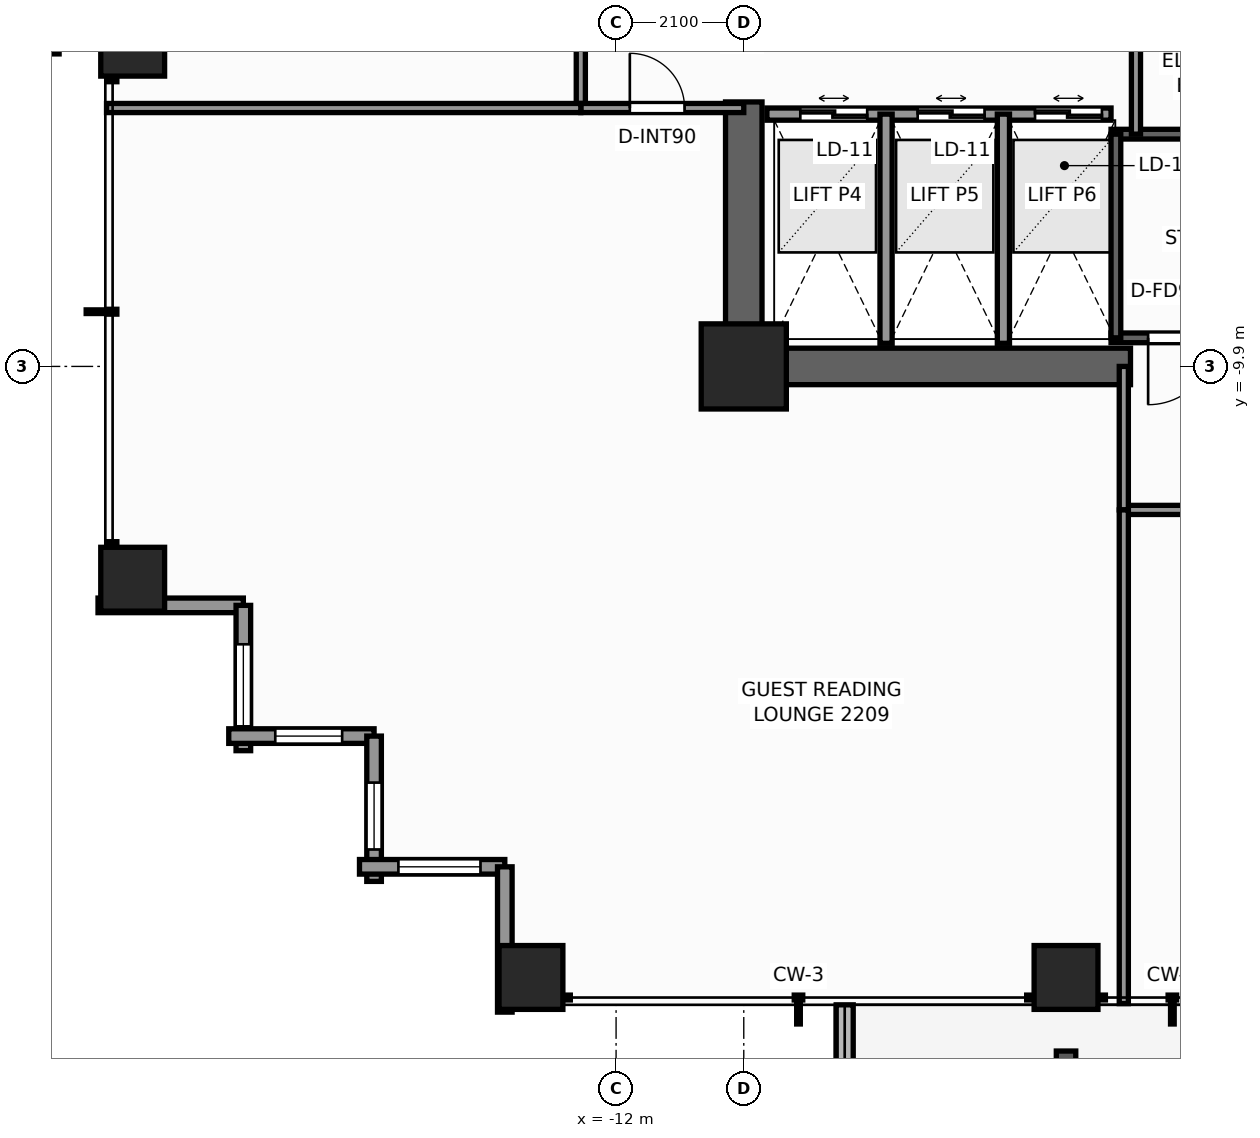
"""IFC4 building model, lengths in metres.
Left out: names, types, materials, properties, quantities, classifications, styles, units other than length and angle.
Written with IfcOpenShell. Run it as: python <this file> out.ifc"""

import sys

from ifc_helpers import new_model, si_unit, direction, frame, frame_2d, origin, origin_2d, place, context, subcontext, project, spatial, rectangle, extrude, element, fill, save


model = new_model("IFC4")
c1 = context("Model", 3, precision=1e-05, world=origin(), true_north=direction((0.0, 1.0)))
c2 = subcontext(c1, "Body", "Model", "MODEL_VIEW")
j1 = project(units=[si_unit("LENGTHUNIT", "METRE"), si_unit("PLANEANGLEUNIT", "RADIAN")], contexts=[c1])
p1 = place(None, origin())
s1 = spatial("IfcSite", under=j1, at=p1, CompositionType="ELEMENT")
p2 = place(p1, origin())
s2 = spatial("IfcBuilding", under=s1, at=p2, CompositionType="ELEMENT")
p3 = place(p2, frame((0.0, 0.0, 78.8)))
s3 = spatial("IfcBuildingStorey", under=s2, at=p3, CompositionType="ELEMENT", Elevation=78.8)
p4 = place(p3, frame((-3.54, -9.9, 0.0), z_axis=(0.0, 0.0, 1.0), x_axis=(-1.0, 0.0, 0.0)))
e1 = element("IfcWall", 1, at=p4, inside=s3, PredefinedType="SHEAR", context=c2, shape_type="SweptSolid", body=[
    extrude(rectangle(XDim=6.66, YDim=0.6, at=frame_2d((3.33, 0.0))), origin(), (0.0, 0.0, 1.0), 3.3),
])
p5 = place(p3, frame((-9.9, -9.6, 0.0), z_axis=(0.0, 0.0, 1.0), x_axis=(0.0, 1.0, 0.0)))
e2 = element("IfcWall", 2, at=p5, inside=s3, PredefinedType="SHEAR", context=c2, shape_type="SweptSolid", body=[
    extrude(rectangle(XDim=4.05, YDim=0.6, at=frame_2d((2.025, 0.0))), origin(), (0.0, 0.0, 1.0), 3.3),
])
p6 = place(p3, frame((-9.9, -9.9, 0.0), z_axis=(0.0, 0.0, 1.0), x_axis=(1.0, 0.0, 0.0)))
e3 = element("IfcColumn", 3, at=p6, inside=s3, PredefinedType="COLUMN", context=c2, shape_type="SweptSolid", body=[
    extrude(rectangle(XDim=1.4, YDim=1.4, at=origin_2d()), origin(), (0.0, 0.0, 1.0), 3.3),
])
for number, where, z_axis, x_axis in (
    (4, (-13.4, -19.95, 0.0), (0.0, 0.0, 1.0), (1.0, 0.0, 0.0)),
    (5, (-4.6, -19.95, 0.0), (0.0, 0.0, 1.0), (1.0, 0.0, 0.0)),
    (6, (-19.95, -13.4, 0.0), (0.0, 0.0, 1.0), (1.0, 0.0, 0.0)),
    (7, (-19.95, -4.6, 0.0), (0.0, 0.0, 1.0), (1.0, 0.0, 0.0)),
):
    element("IfcColumn", number, at=place(p3, frame(where, z_axis=z_axis, x_axis=x_axis)), inside=s3, PredefinedType="COLUMN", context=c2, shape_type="SweptSolid", body=[
        extrude(rectangle(XDim=1.05, YDim=1.05, at=origin_2d()), origin(), (0.0, 0.0, 1.0), 3.3),
    ])
p7 = place(p3, frame((-8.24, -20.4, -0.04), z_axis=(0.0, 0.0, 1.0), x_axis=(0.0, -1.0, 0.0)))
e8 = element("IfcWall", 8, at=p7, inside=s3, PredefinedType="PARAPET", context=c2, shape_type="SweptSolid", body=[
    extrude(rectangle(XDim=1.466, YDim=0.28, at=frame_2d((0.733, 0.0))), origin(), (0.0, 0.0, 1.0), 0.42),
])
p8 = place(p3, frame((-18.13, -13.83, 0.0), z_axis=(0.0, 0.0, 1.0), x_axis=(-1.0, 0.0, 0.0)))
e9 = element("IfcWall", 9, at=p8, inside=s3, PredefinedType="STANDARD", context=c2, shape_type="SweptSolid", body=[
    extrude(rectangle(XDim=2.39, YDim=0.24, at=frame_2d((1.195, 0.0))), origin(), (0.0, 0.0, 1.0), 2.459),
])
p9 = place(p3, frame((-18.13, -16.22, 0.0), z_axis=(0.0, 0.0, 1.0), x_axis=(0.0, 1.0, 0.0)))
e10 = element("IfcWall", 10, at=p9, inside=s3, PredefinedType="STANDARD", context=c2, shape_type="SweptSolid", body=[
    extrude(rectangle(XDim=2.39, YDim=0.24, at=frame_2d((1.195, 0.0))), origin(), (0.0, 0.0, 1.0), 2.459),
])
p10 = place(p9, frame((0.4, 0.0, 0.65)))
e11 = element("IfcOpeningElement", 11, at=p10, cuts=e10, PredefinedType="OPENING", context=c2, shape_type="SweptSolid", body=[
    extrude(rectangle(XDim=1.35, YDim=1.55, at=frame_2d((0.675, 0.775))), frame((0.0, 0.13, 0.0), z_axis=(0.0, -1.0, 0.0), x_axis=(1.0, 0.0, 0.0)), (0.0, 0.0, 1.0), 0.26),
])
p11 = place(p3, frame((-15.98, -15.98, 0.0), z_axis=(0.0, 0.0, 1.0), x_axis=(-1.0, 0.0, 0.0)))
e12 = element("IfcWall", 12, at=p11, inside=s3, PredefinedType="STANDARD", context=c2, shape_type="SweptSolid", body=[
    extrude(rectangle(XDim=2.39, YDim=0.24, at=frame_2d((1.195, 0.0))), origin(), (0.0, 0.0, 1.0), 2.459),
])
p12 = place(p11, frame((0.525, 0.0, 0.65)))
e13 = element("IfcOpeningElement", 13, at=p12, cuts=e12, PredefinedType="OPENING", context=c2, shape_type="SweptSolid", body=[
    extrude(rectangle(XDim=1.1, YDim=1.45, at=frame_2d((0.55, 0.725))), frame((0.0, 0.13, 0.0), z_axis=(0.0, -1.0, 0.0), x_axis=(1.0, 0.0, 0.0)), (0.0, 0.0, 1.0), 0.26),
])
p13 = place(p3, frame((-15.98, -18.37, 0.0), z_axis=(0.0, 0.0, 1.0), x_axis=(0.0, 1.0, 0.0)))
e14 = element("IfcWall", 14, at=p13, inside=s3, PredefinedType="STANDARD", context=c2, shape_type="SweptSolid", body=[
    extrude(rectangle(XDim=2.39, YDim=0.24, at=frame_2d((1.195, 0.0))), origin(), (0.0, 0.0, 1.0), 2.459),
])
p14 = place(p13, frame((0.525, 0.0, 0.65)))
e15 = element("IfcOpeningElement", 15, at=p14, cuts=e14, PredefinedType="OPENING", context=c2, shape_type="SweptSolid", body=[
    extrude(rectangle(XDim=1.1, YDim=1.45, at=frame_2d((0.55, 0.725))), frame((0.0, 0.13, 0.0), z_axis=(0.0, -1.0, 0.0), x_axis=(1.0, 0.0, 0.0)), (0.0, 0.0, 1.0), 0.26),
])
p15 = place(p3, frame((-13.83, -18.13, 0.0), z_axis=(0.0, 0.0, 1.0), x_axis=(-1.0, 0.0, 0.0)))
e16 = element("IfcWall", 16, at=p15, inside=s3, PredefinedType="STANDARD", context=c2, shape_type="SweptSolid", body=[
    extrude(rectangle(XDim=2.39, YDim=0.24, at=frame_2d((1.195, 0.0))), origin(), (0.0, 0.0, 1.0), 2.459),
])
p16 = place(p15, frame((0.4, 0.0, 0.65)))
e17 = element("IfcOpeningElement", 17, at=p16, cuts=e16, PredefinedType="OPENING", context=c2, shape_type="SweptSolid", body=[
    extrude(rectangle(XDim=1.35, YDim=1.55, at=frame_2d((0.675, 0.775))), frame((0.0, 0.13, 0.0), z_axis=(0.0, -1.0, 0.0), x_axis=(1.0, 0.0, 0.0)), (0.0, 0.0, 1.0), 0.26),
])
p17 = place(p3, frame((-13.83, -20.52, 0.0), z_axis=(0.0, 0.0, 1.0), x_axis=(0.0, 1.0, 0.0)))
e18 = element("IfcWall", 18, at=p17, inside=s3, PredefinedType="STANDARD", context=c2, shape_type="SweptSolid", body=[
    extrude(rectangle(XDim=2.39, YDim=0.24, at=frame_2d((1.195, 0.0))), origin(), (0.0, 0.0, 1.0), 2.459),
])
p18 = place(p3, frame((3.86, -9.43, 0.0), z_axis=(0.0, 0.0, 1.0), x_axis=(-1.0, 0.0, 0.0)))
e19 = element("IfcWall", 19, at=p18, inside=s3, PredefinedType="SHEAR", context=c2, shape_type="SweptSolid", body=[
    extrude(rectangle(XDim=7.72, YDim=0.16, at=frame_2d((3.86, 0.0))), origin(), (0.0, 0.0, 1.0), 3.3),
])
p19 = place(p18, frame((6.01, 0.0, 0.0)))
e20 = element("IfcOpeningElement", 20, at=p19, cuts=e19, PredefinedType="OPENING", context=c2, shape_type="SweptSolid", body=[
    extrude(rectangle(XDim=1.1, YDim=2.2, at=frame_2d((0.55, 1.1))), frame((0.0, 0.09, 0.0), z_axis=(0.0, -1.0, 0.0), x_axis=(1.0, 0.0, 0.0)), (0.0, 0.0, 1.0), 0.18),
])
p20 = place(p3, frame((-3.86, -6.08, 0.0), z_axis=(0.0, 0.0, 1.0), x_axis=(1.0, 0.0, 0.0)))
e21 = element("IfcWall", 21, at=p20, inside=s3, PredefinedType="SHEAR", context=c2, shape_type="SweptSolid", body=[
    extrude(rectangle(XDim=7.72, YDim=0.16, at=frame_2d((3.86, 0.0))), origin(), (0.0, 0.0, 1.0), 3.3),
])
p21 = place(p3, frame((-3.78, -9.43, 0.0), z_axis=(0.0, 0.0, 1.0), x_axis=(0.0, 1.0, 0.0)))
e22 = element("IfcWall", 22, at=p21, inside=s3, PredefinedType="SHEAR", context=c2, shape_type="SweptSolid", body=[
    extrude(rectangle(XDim=3.35, YDim=0.16, at=frame_2d((1.675, 0.0))), origin(), (0.0, 0.0, 1.0), 3.3),
])
p22 = place(p3, frame((-9.52, -5.75, 0.0), z_axis=(0.0, 0.0, 1.0), x_axis=(1.0, 0.0, 0.0)))
e23 = element("IfcWall", 23, at=p22, inside=s3, PredefinedType="SOLIDWALL", context=c2, shape_type="SweptSolid", body=[
    extrude(rectangle(XDim=5.66, YDim=0.2, at=frame_2d((2.83, 0.0))), origin(), (0.0, 0.0, 1.0), 3.08),
])
p23 = place(p22, frame((0.55, 0.0, 0.0)))
e24 = element("IfcOpeningElement", 24, at=p23, cuts=e23, PredefinedType="OPENING", context=c2, shape_type="SweptSolid", body=[
    extrude(rectangle(XDim=1.1, YDim=2.2, at=frame_2d((0.55, 1.1))), frame((0.0, 0.11, 0.0), z_axis=(0.0, -1.0, 0.0), x_axis=(1.0, 0.0, 0.0)), (0.0, 0.0, 1.0), 0.22),
])
p24 = place(p22, frame((2.48, 0.0, 0.0)))
e25 = element("IfcOpeningElement", 25, at=p24, cuts=e23, PredefinedType="OPENING", context=c2, shape_type="SweptSolid", body=[
    extrude(rectangle(XDim=1.1, YDim=2.2, at=frame_2d((0.55, 1.1))), frame((0.0, 0.11, 0.0), z_axis=(0.0, -1.0, 0.0), x_axis=(1.0, 0.0, 0.0)), (0.0, 0.0, 1.0), 0.22),
])
p25 = place(p22, frame((4.41, 0.0, 0.0)))
e26 = element("IfcOpeningElement", 26, at=p25, cuts=e23, PredefinedType="OPENING", context=c2, shape_type="SweptSolid", body=[
    extrude(rectangle(XDim=1.1, YDim=2.2, at=frame_2d((0.55, 1.1))), frame((0.0, 0.11, 0.0), z_axis=(0.0, -1.0, 0.0), x_axis=(1.0, 0.0, 0.0)), (0.0, 0.0, 1.0), 0.22),
])
for number, where, z_axis, x_axis in (
    (27, (-7.56, -9.52, 0.0), (0.0, 0.0, 1.0), (0.0, 1.0, 0.0)),
    (28, (-5.63, -9.52, 0.0), (0.0, 0.0, 1.0), (0.0, 1.0, 0.0)),
):
    element("IfcWall", number, at=place(p3, frame(where, z_axis=z_axis, x_axis=x_axis)), inside=s3, PredefinedType="SOLIDWALL", context=c2, shape_type="SweptSolid", body=[
        extrude(rectangle(XDim=3.77, YDim=0.2, at=frame_2d((1.885, 0.0))), origin(), (0.0, 0.0, 1.0), 3.08),
    ])
p26 = place(p3, frame((-3.45, -6.08, 0.0), z_axis=(0.0, 0.0, 1.0), x_axis=(0.0, 1.0, 0.0)))
e29 = element("IfcWall", 29, at=p26, inside=s3, PredefinedType="PARTITIONING", context=c2, shape_type="SweptSolid", body=[
    extrude(rectangle(XDim=2.36, YDim=0.15, at=frame_2d((1.18, 0.0))), origin(), (0.0, 0.0, 1.0), 3.08),
])
p27 = place(p3, frame((-3.65, -12.26, 0.0), z_axis=(0.0, 0.0, 1.0), x_axis=(1.0, 0.0, 0.0)))
e30 = element("IfcWall", 30, at=p27, inside=s3, PredefinedType="PARTITIONING", context=c2, shape_type="SweptSolid", body=[
    extrude(rectangle(XDim=16.23, YDim=0.15, at=frame_2d((8.115, 0.0))), origin(), (0.0, 0.0, 1.0), 2.292),
])
p28 = place(p27, frame((1.397, 0.0, 0.0)))
e31 = element("IfcOpeningElement", 31, at=p28, cuts=e30, PredefinedType="OPENING", context=c2, shape_type="SweptSolid", body=[
    extrude(rectangle(XDim=0.95, YDim=2.06, at=frame_2d((0.475, 1.03))), frame((0.0, 0.085, 0.0), z_axis=(0.0, -1.0, 0.0), x_axis=(1.0, 0.0, 0.0)), (0.0, 0.0, 1.0), 0.17),
])
p29 = place(p27, frame((10.735, 0.0, 0.0)))
e32 = element("IfcOpeningElement", 32, at=p29, cuts=e30, PredefinedType="OPENING", context=c2, shape_type="SweptSolid", body=[
    extrude(rectangle(XDim=0.9, YDim=2.06, at=frame_2d((0.45, 1.03))), frame((0.0, 0.085, 0.0), z_axis=(0.0, -1.0, 0.0), x_axis=(1.0, 0.0, 0.0)), (0.0, 0.0, 1.0), 0.17),
])
p30 = place(p3, frame((-3.65, -12.26, 0.0), z_axis=(0.0, 0.0, 1.0), x_axis=(0.0, 1.0, 0.0)))
e33 = element("IfcWall", 33, at=p30, inside=s3, PredefinedType="PARTITIONING", context=c2, shape_type="SweptSolid", body=[
    extrude(rectangle(XDim=2.36, YDim=0.15, at=frame_2d((1.18, 0.0))), origin(), (0.0, 0.0, 1.0), 3.08),
])
p31 = place(p3, frame((-12.58, -5.65, 0.0), z_axis=(0.0, 0.0, 1.0), x_axis=(0.0, 1.0, 0.0)))
e34 = element("IfcWall", 34, at=p31, inside=s3, PredefinedType="PARTITIONING", context=c2, shape_type="SweptSolid", body=[
    extrude(rectangle(XDim=3.6, YDim=0.15, at=frame_2d((1.8, 0.0))), origin(), (0.0, 0.0, 1.0), 2.292),
])
p32 = place(p31, frame((2.156, 0.0, 0.0)))
e35 = element("IfcOpeningElement", 35, at=p32, cuts=e34, PredefinedType="OPENING", context=c2, shape_type="SweptSolid", body=[
    extrude(rectangle(XDim=0.9, YDim=2.06, at=frame_2d((0.45, 1.03))), frame((0.0, 0.085, 0.0), z_axis=(0.0, -1.0, 0.0), x_axis=(1.0, 0.0, 0.0)), (0.0, 0.0, 1.0), 0.17),
])
p33 = place(p3, frame((-12.58, -5.65, 0.0), z_axis=(0.0, 0.0, 1.0), x_axis=(1.0, 0.0, 0.0)))
e36 = element("IfcWall", 36, at=p33, inside=s3, PredefinedType="PARTITIONING", context=c2, shape_type="SweptSolid", body=[
    extrude(rectangle(XDim=2.68, YDim=0.15, at=frame_2d((1.34, 0.0))), origin(), (0.0, 0.0, 1.0), 3.08),
])
p34 = place(p33, frame((0.806, 0.0, 0.0)))
e37 = element("IfcOpeningElement", 37, at=p34, cuts=e36, PredefinedType="OPENING", context=c2, shape_type="SweptSolid", body=[
    extrude(rectangle(XDim=0.9, YDim=2.06, at=frame_2d((0.45, 1.03))), frame((0.0, 0.085, 0.0), z_axis=(0.0, -1.0, 0.0), x_axis=(1.0, 0.0, 0.0)), (0.0, 0.0, 1.0), 0.17),
])
p35 = place(p3, frame((-20.38, -5.65, 0.0), z_axis=(0.0, 0.0, 1.0), x_axis=(1.0, 0.0, 0.0)))
e38 = element("IfcWall", 38, at=p35, inside=s3, PredefinedType="PARTITIONING", context=c2, shape_type="SweptSolid", body=[
    extrude(rectangle(XDim=7.8, YDim=0.15, at=frame_2d((3.9, 0.0))), origin(), (0.0, 0.0, 1.0), 2.449),
])
p36 = place(p3, frame((-3.65, -20.38, 0.0), z_axis=(0.0, 0.0, 1.0), x_axis=(0.0, 1.0, 0.0)))
e39 = element("IfcWall", 39, at=p36, inside=s3, PredefinedType="PARTITIONING", context=c2, shape_type="SweptSolid", body=[
    extrude(rectangle(XDim=8.12, YDim=0.15, at=frame_2d((4.06, 0.0))), origin(), (0.0, 0.0, 1.0), 2.449),
])
p37 = place(p10, origin())
e40 = element("IfcWindow", 40, at=p37, inside=s3, PartitioningType="SINGLE_PANEL", PredefinedType="WINDOW", context=c2, shape_type="SweptSolid", body=[
    extrude(rectangle(XDim=1.35, YDim=1.55, at=frame_2d((0.675, 0.775))), frame((0.0, 0.03, 0.0), z_axis=(0.0, -1.0, 0.0), x_axis=(1.0, 0.0, 0.0)), (0.0, 0.0, 1.0), 0.06),
])
fill(e11, e40)
p38 = place(p12, origin())
e41 = element("IfcWindow", 41, at=p38, inside=s3, PartitioningType="SINGLE_PANEL", PredefinedType="WINDOW", context=c2, shape_type="SweptSolid", body=[
    extrude(rectangle(XDim=1.1, YDim=1.45, at=frame_2d((0.55, 0.725))), frame((0.0, 0.03, 0.0), z_axis=(0.0, -1.0, 0.0), x_axis=(1.0, 0.0, 0.0)), (0.0, 0.0, 1.0), 0.06),
])
fill(e13, e41)
p39 = place(p14, origin())
e42 = element("IfcWindow", 42, at=p39, inside=s3, PartitioningType="SINGLE_PANEL", PredefinedType="WINDOW", context=c2, shape_type="SweptSolid", body=[
    extrude(rectangle(XDim=1.1, YDim=1.45, at=frame_2d((0.55, 0.725))), frame((0.0, 0.03, 0.0), z_axis=(0.0, -1.0, 0.0), x_axis=(1.0, 0.0, 0.0)), (0.0, 0.0, 1.0), 0.06),
])
fill(e15, e42)
p40 = place(p16, origin())
e43 = element("IfcWindow", 43, at=p40, inside=s3, PartitioningType="SINGLE_PANEL", PredefinedType="WINDOW", context=c2, shape_type="SweptSolid", body=[
    extrude(rectangle(XDim=1.35, YDim=1.55, at=frame_2d((0.675, 0.775))), frame((0.0, 0.03, 0.0), z_axis=(0.0, -1.0, 0.0), x_axis=(1.0, 0.0, 0.0)), (0.0, 0.0, 1.0), 0.06),
])
fill(e17, e43)
p41 = place(p19, origin())
e44 = element("IfcDoor", 44, at=p41, inside=s3, OperationType="SINGLE_SWING_RIGHT", PredefinedType="DOOR", context=c2, shape_type="SweptSolid", body=[
    extrude(rectangle(XDim=1.1, YDim=2.2, at=frame_2d((0.55, 1.1))), frame((0.0, 0.025, 0.0), z_axis=(0.0, -1.0, 0.0), x_axis=(1.0, 0.0, 0.0)), (0.0, 0.0, 1.0), 0.05),
])
fill(e20, e44)
p42 = place(p23, origin())
e45 = element("IfcDoor", 45, at=p42, inside=s3, OperationType="DOUBLE_DOOR_SLIDING", PredefinedType="DOOR", context=c2, shape_type="SweptSolid", body=[
    extrude(rectangle(XDim=1.1, YDim=2.2, at=frame_2d((0.55, 1.1))), frame((0.0, 0.025, 0.0), z_axis=(0.0, -1.0, 0.0), x_axis=(1.0, 0.0, 0.0)), (0.0, 0.0, 1.0), 0.05),
])
fill(e24, e45)
p43 = place(p24, origin())
e46 = element("IfcDoor", 46, at=p43, inside=s3, OperationType="DOUBLE_DOOR_SLIDING", PredefinedType="DOOR", context=c2, shape_type="SweptSolid", body=[
    extrude(rectangle(XDim=1.1, YDim=2.2, at=frame_2d((0.55, 1.1))), frame((0.0, 0.025, 0.0), z_axis=(0.0, -1.0, 0.0), x_axis=(1.0, 0.0, 0.0)), (0.0, 0.0, 1.0), 0.05),
])
fill(e25, e46)
p44 = place(p25, origin())
e47 = element("IfcDoor", 47, at=p44, inside=s3, OperationType="DOUBLE_DOOR_SLIDING", PredefinedType="DOOR", context=c2, shape_type="SweptSolid", body=[
    extrude(rectangle(XDim=1.1, YDim=2.2, at=frame_2d((0.55, 1.1))), frame((0.0, 0.025, 0.0), z_axis=(0.0, -1.0, 0.0), x_axis=(1.0, 0.0, 0.0)), (0.0, 0.0, 1.0), 0.05),
])
fill(e26, e47)
p45 = place(p34, origin())
e48 = element("IfcDoor", 48, at=p45, inside=s3, OperationType="SINGLE_SWING_LEFT", PredefinedType="DOOR", context=c2, shape_type="SweptSolid", body=[
    extrude(rectangle(XDim=0.9, YDim=2.06, at=frame_2d((0.45, 1.03))), frame((0.0, 0.025, 0.0), z_axis=(0.0, -1.0, 0.0), x_axis=(1.0, 0.0, 0.0)), (0.0, 0.0, 1.0), 0.05),
])
fill(e37, e48)
save(model, sys.argv[1])
